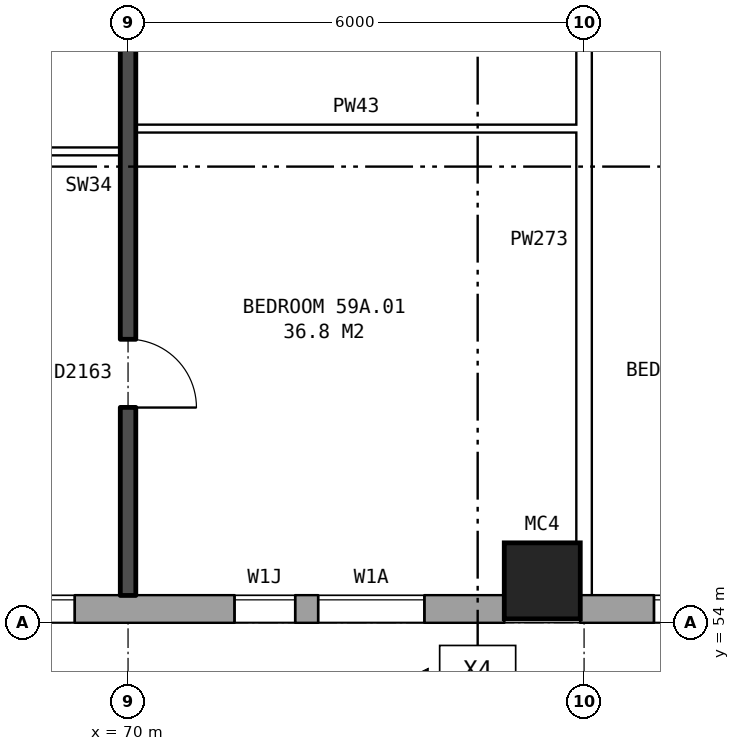
"""IFC4 building model, lengths in metres.
Left out: names, types, materials, properties, quantities, classifications, styles, units other than length and angle.
Written with IfcOpenShell. Run it as: python <this file> out.ifc"""

import sys

from ifc_helpers import new_model, si_unit, direction, frame, frame_2d, origin, origin_2d, place, context, subcontext, project, spatial, rectangle, hollow_rectangle, extrude, element, fill, save


model = new_model("IFC4")
c1 = context("Model", 3, precision=1e-05, world=origin(), true_north=direction((0.0, 1.0)))
c2 = subcontext(c1, "Body", "Model", "MODEL_VIEW")
j1 = project(units=[si_unit("LENGTHUNIT", "METRE"), si_unit("PLANEANGLEUNIT", "RADIAN")], contexts=[c1])
p1 = place(None, origin())
s1 = spatial("IfcSite", under=j1, at=p1, CompositionType="ELEMENT")
p2 = place(p1, origin())
s2 = spatial("IfcBuilding", under=s1, at=p2, CompositionType="ELEMENT")
p3 = place(p2, frame((0.0, 0.0, 209.0)))
s3 = spatial("IfcBuildingStorey", under=s2, at=p3, CompositionType="ELEMENT", Elevation=209.0)
p4 = place(p3, frame((75.45, 54.55, 0.0), z_axis=(0.0, 0.0, 1.0), x_axis=(1.0, 0.0, 0.0)))
e1 = element("IfcColumn", 1, at=p4, inside=s3, PredefinedType="COLUMN", context=c2, shape_type="SweptSolid", body=[
    extrude(hollow_rectangle(XDim=1.0, YDim=1.0, WallThickness=0.055, at=origin_2d()), origin(), (0.0, 0.0, 1.0), 3.1),
])
p5 = place(p3, frame((35.075, 54.18, 0.0), z_axis=(0.0, 0.0, 1.0), x_axis=(1.0, 0.0, 0.0)))
e2 = element("IfcWall", 2, at=p5, inside=s3, PredefinedType="STANDARD", context=c2, shape_type="SweptSolid", body=[
    extrude(rectangle(XDim=39.875, YDim=0.36, at=frame_2d((19.938, 0.0))), origin(), (0.0, 0.0, 1.0), 2.85),
])
p6 = place(p5, frame((0.3, 0.0, 0.8)))
e3 = element("IfcOpeningElement", 3, at=p6, cuts=e2, PredefinedType="OPENING", context=c2, shape_type="SweptSolid", body=[
    extrude(rectangle(XDim=1.0, YDim=1.8, at=frame_2d((0.5, 0.9))), frame((0.0, 0.19, 0.0), z_axis=(0.0, -1.0, 0.0), x_axis=(1.0, 0.0, 0.0)), (0.0, 0.0, 1.0), 0.38),
])
p7 = place(p5, frame((5.625, 0.0, 0.8)))
e4 = element("IfcOpeningElement", 4, at=p7, cuts=e2, PredefinedType="OPENING", context=c2, shape_type="SweptSolid", body=[
    extrude(rectangle(XDim=1.6, YDim=1.8, at=frame_2d((0.8, 0.9))), frame((0.0, 0.19, 0.0), z_axis=(0.0, -1.0, 0.0), x_axis=(1.0, 0.0, 0.0)), (0.0, 0.0, 1.0), 0.38),
])
p8 = place(p5, frame((8.625, 0.0, 0.8)))
e5 = element("IfcOpeningElement", 5, at=p8, cuts=e2, PredefinedType="OPENING", context=c2, shape_type="SweptSolid", body=[
    extrude(rectangle(XDim=1.6, YDim=1.8, at=frame_2d((0.8, 0.9))), frame((0.0, 0.19, 0.0), z_axis=(0.0, -1.0, 0.0), x_axis=(1.0, 0.0, 0.0)), (0.0, 0.0, 1.0), 0.38),
])
p9 = place(p5, frame((11.625, 0.0, 0.8)))
e6 = element("IfcOpeningElement", 6, at=p9, cuts=e2, PredefinedType="OPENING", context=c2, shape_type="SweptSolid", body=[
    extrude(rectangle(XDim=1.6, YDim=1.8, at=frame_2d((0.8, 0.9))), frame((0.0, 0.19, 0.0), z_axis=(0.0, -1.0, 0.0), x_axis=(1.0, 0.0, 0.0)), (0.0, 0.0, 1.0), 0.38),
])
p10 = place(p5, frame((14.625, 0.0, 0.8)))
e7 = element("IfcOpeningElement", 7, at=p10, cuts=e2, PredefinedType="OPENING", context=c2, shape_type="SweptSolid", body=[
    extrude(rectangle(XDim=1.6, YDim=1.8, at=frame_2d((0.8, 0.9))), frame((0.0, 0.19, 0.0), z_axis=(0.0, -1.0, 0.0), x_axis=(1.0, 0.0, 0.0)), (0.0, 0.0, 1.0), 0.38),
])
p11 = place(p5, frame((17.625, 0.0, 0.8)))
e8 = element("IfcOpeningElement", 8, at=p11, cuts=e2, PredefinedType="OPENING", context=c2, shape_type="SweptSolid", body=[
    extrude(rectangle(XDim=1.6, YDim=1.8, at=frame_2d((0.8, 0.9))), frame((0.0, 0.19, 0.0), z_axis=(0.0, -1.0, 0.0), x_axis=(1.0, 0.0, 0.0)), (0.0, 0.0, 1.0), 0.38),
])
p12 = place(p5, frame((20.625, 0.0, 0.8)))
e9 = element("IfcOpeningElement", 9, at=p12, cuts=e2, PredefinedType="OPENING", context=c2, shape_type="SweptSolid", body=[
    extrude(rectangle(XDim=1.6, YDim=1.8, at=frame_2d((0.8, 0.9))), frame((0.0, 0.19, 0.0), z_axis=(0.0, -1.0, 0.0), x_axis=(1.0, 0.0, 0.0)), (0.0, 0.0, 1.0), 0.38),
])
p13 = place(p5, frame((23.625, 0.0, 0.8)))
e10 = element("IfcOpeningElement", 10, at=p13, cuts=e2, PredefinedType="OPENING", context=c2, shape_type="SweptSolid", body=[
    extrude(rectangle(XDim=1.6, YDim=1.8, at=frame_2d((0.8, 0.9))), frame((0.0, 0.19, 0.0), z_axis=(0.0, -1.0, 0.0), x_axis=(1.0, 0.0, 0.0)), (0.0, 0.0, 1.0), 0.38),
])
p14 = place(p5, frame((26.625, 0.0, 0.8)))
e11 = element("IfcOpeningElement", 11, at=p14, cuts=e2, PredefinedType="OPENING", context=c2, shape_type="SweptSolid", body=[
    extrude(rectangle(XDim=1.6, YDim=1.8, at=frame_2d((0.8, 0.9))), frame((0.0, 0.19, 0.0), z_axis=(0.0, -1.0, 0.0), x_axis=(1.0, 0.0, 0.0)), (0.0, 0.0, 1.0), 0.38),
])
p15 = place(p5, frame((29.625, 0.0, 0.8)))
e12 = element("IfcOpeningElement", 12, at=p15, cuts=e2, PredefinedType="OPENING", context=c2, shape_type="SweptSolid", body=[
    extrude(rectangle(XDim=1.6, YDim=1.8, at=frame_2d((0.8, 0.9))), frame((0.0, 0.19, 0.0), z_axis=(0.0, -1.0, 0.0), x_axis=(1.0, 0.0, 0.0)), (0.0, 0.0, 1.0), 0.38),
])
p16 = place(p5, frame((32.625, 0.0, 0.8)))
e13 = element("IfcOpeningElement", 13, at=p16, cuts=e2, PredefinedType="OPENING", context=c2, shape_type="SweptSolid", body=[
    extrude(rectangle(XDim=1.6, YDim=1.8, at=frame_2d((0.8, 0.9))), frame((0.0, 0.19, 0.0), z_axis=(0.0, -1.0, 0.0), x_axis=(1.0, 0.0, 0.0)), (0.0, 0.0, 1.0), 0.38),
])
p17 = place(p5, frame((36.325, 0.0, 1.1)))
e14 = element("IfcOpeningElement", 14, at=p17, cuts=e2, PredefinedType="OPENING", context=c2, shape_type="SweptSolid", body=[
    extrude(rectangle(XDim=0.8, YDim=1.5, at=frame_2d((0.4, 0.75))), frame((0.0, 0.19, 0.0), z_axis=(0.0, -1.0, 0.0), x_axis=(1.0, 0.0, 0.0)), (0.0, 0.0, 1.0), 0.38),
])
p18 = place(p5, frame((3.65, 0.0, 0.8)))
e15 = element("IfcOpeningElement", 15, at=p18, cuts=e2, PredefinedType="OPENING", context=c2, shape_type="SweptSolid", body=[
    extrude(rectangle(XDim=1.0, YDim=1.8, at=frame_2d((0.5, 0.9))), frame((0.0, 0.19, 0.0), z_axis=(0.0, -1.0, 0.0), x_axis=(1.0, 0.0, 0.0)), (0.0, 0.0, 1.0), 0.38),
])
p19 = place(p5, frame((37.425, 0.0, 0.8)))
e16 = element("IfcOpeningElement", 16, at=p19, cuts=e2, PredefinedType="OPENING", context=c2, shape_type="SweptSolid", body=[
    extrude(rectangle(XDim=1.4, YDim=1.8, at=frame_2d((0.7, 0.9))), frame((0.0, 0.19, 0.0), z_axis=(0.0, -1.0, 0.0), x_axis=(1.0, 0.0, 0.0)), (0.0, 0.0, 1.0), 0.38),
])
p20 = place(p3, frame((75.95, 54.18, 0.0), z_axis=(0.0, 0.0, 1.0), x_axis=(1.0, 0.0, 0.0)))
e17 = element("IfcWall", 17, at=p20, inside=s3, PredefinedType="STANDARD", context=c2, shape_type="SweptSolid", body=[
    extrude(rectangle(XDim=55.1, YDim=0.36, at=frame_2d((27.55, 0.0))), origin(), (0.0, 0.0, 1.0), 2.85),
])
p21 = place(p20, frame((0.969, 0.0, 0.8)))
e18 = element("IfcOpeningElement", 18, at=p21, cuts=e17, PredefinedType="OPENING", context=c2, shape_type="SweptSolid", body=[
    extrude(rectangle(XDim=1.6, YDim=1.8, at=frame_2d((0.8, 0.9))), frame((0.0, 0.19, 0.0), z_axis=(0.0, -1.0, 0.0), x_axis=(1.0, 0.0, 0.0)), (0.0, 0.0, 1.0), 0.38),
])
p22 = place(p20, frame((4.406, 0.0, 0.8)))
e19 = element("IfcOpeningElement", 19, at=p22, cuts=e17, PredefinedType="OPENING", context=c2, shape_type="SweptSolid", body=[
    extrude(rectangle(XDim=1.6, YDim=1.8, at=frame_2d((0.8, 0.9))), frame((0.0, 0.19, 0.0), z_axis=(0.0, -1.0, 0.0), x_axis=(1.0, 0.0, 0.0)), (0.0, 0.0, 1.0), 0.38),
])
p23 = place(p20, frame((7.844, 0.0, 0.8)))
e20 = element("IfcOpeningElement", 20, at=p23, cuts=e17, PredefinedType="OPENING", context=c2, shape_type="SweptSolid", body=[
    extrude(rectangle(XDim=1.6, YDim=1.8, at=frame_2d((0.8, 0.9))), frame((0.0, 0.19, 0.0), z_axis=(0.0, -1.0, 0.0), x_axis=(1.0, 0.0, 0.0)), (0.0, 0.0, 1.0), 0.38),
])
p24 = place(p20, frame((11.281, 0.0, 0.8)))
e21 = element("IfcOpeningElement", 21, at=p24, cuts=e17, PredefinedType="OPENING", context=c2, shape_type="SweptSolid", body=[
    extrude(rectangle(XDim=1.6, YDim=1.8, at=frame_2d((0.8, 0.9))), frame((0.0, 0.19, 0.0), z_axis=(0.0, -1.0, 0.0), x_axis=(1.0, 0.0, 0.0)), (0.0, 0.0, 1.0), 0.38),
])
p25 = place(p20, frame((14.719, 0.0, 0.8)))
e22 = element("IfcOpeningElement", 22, at=p25, cuts=e17, PredefinedType="OPENING", context=c2, shape_type="SweptSolid", body=[
    extrude(rectangle(XDim=1.6, YDim=1.8, at=frame_2d((0.8, 0.9))), frame((0.0, 0.19, 0.0), z_axis=(0.0, -1.0, 0.0), x_axis=(1.0, 0.0, 0.0)), (0.0, 0.0, 1.0), 0.38),
])
p26 = place(p20, frame((18.156, 0.0, 0.8)))
e23 = element("IfcOpeningElement", 23, at=p26, cuts=e17, PredefinedType="OPENING", context=c2, shape_type="SweptSolid", body=[
    extrude(rectangle(XDim=1.6, YDim=1.8, at=frame_2d((0.8, 0.9))), frame((0.0, 0.19, 0.0), z_axis=(0.0, -1.0, 0.0), x_axis=(1.0, 0.0, 0.0)), (0.0, 0.0, 1.0), 0.38),
])
p27 = place(p20, frame((21.594, 0.0, 0.8)))
e24 = element("IfcOpeningElement", 24, at=p27, cuts=e17, PredefinedType="OPENING", context=c2, shape_type="SweptSolid", body=[
    extrude(rectangle(XDim=1.6, YDim=1.8, at=frame_2d((0.8, 0.9))), frame((0.0, 0.19, 0.0), z_axis=(0.0, -1.0, 0.0), x_axis=(1.0, 0.0, 0.0)), (0.0, 0.0, 1.0), 0.38),
])
p28 = place(p20, frame((25.031, 0.0, 0.8)))
e25 = element("IfcOpeningElement", 25, at=p28, cuts=e17, PredefinedType="OPENING", context=c2, shape_type="SweptSolid", body=[
    extrude(rectangle(XDim=1.6, YDim=1.8, at=frame_2d((0.8, 0.9))), frame((0.0, 0.19, 0.0), z_axis=(0.0, -1.0, 0.0), x_axis=(1.0, 0.0, 0.0)), (0.0, 0.0, 1.0), 0.38),
])
p29 = place(p20, frame((28.469, 0.0, 0.8)))
e26 = element("IfcOpeningElement", 26, at=p29, cuts=e17, PredefinedType="OPENING", context=c2, shape_type="SweptSolid", body=[
    extrude(rectangle(XDim=1.6, YDim=1.8, at=frame_2d((0.8, 0.9))), frame((0.0, 0.19, 0.0), z_axis=(0.0, -1.0, 0.0), x_axis=(1.0, 0.0, 0.0)), (0.0, 0.0, 1.0), 0.38),
])
p30 = place(p20, frame((31.906, 0.0, 0.8)))
e27 = element("IfcOpeningElement", 27, at=p30, cuts=e17, PredefinedType="OPENING", context=c2, shape_type="SweptSolid", body=[
    extrude(rectangle(XDim=1.6, YDim=1.8, at=frame_2d((0.8, 0.9))), frame((0.0, 0.19, 0.0), z_axis=(0.0, -1.0, 0.0), x_axis=(1.0, 0.0, 0.0)), (0.0, 0.0, 1.0), 0.38),
])
p31 = place(p20, frame((35.344, 0.0, 0.8)))
e28 = element("IfcOpeningElement", 28, at=p31, cuts=e17, PredefinedType="OPENING", context=c2, shape_type="SweptSolid", body=[
    extrude(rectangle(XDim=1.6, YDim=1.8, at=frame_2d((0.8, 0.9))), frame((0.0, 0.19, 0.0), z_axis=(0.0, -1.0, 0.0), x_axis=(1.0, 0.0, 0.0)), (0.0, 0.0, 1.0), 0.38),
])
p32 = place(p20, frame((38.781, 0.0, 0.8)))
e29 = element("IfcOpeningElement", 29, at=p32, cuts=e17, PredefinedType="OPENING", context=c2, shape_type="SweptSolid", body=[
    extrude(rectangle(XDim=1.6, YDim=1.8, at=frame_2d((0.8, 0.9))), frame((0.0, 0.19, 0.0), z_axis=(0.0, -1.0, 0.0), x_axis=(1.0, 0.0, 0.0)), (0.0, 0.0, 1.0), 0.38),
])
p33 = place(p20, frame((42.219, 0.0, 0.8)))
e30 = element("IfcOpeningElement", 30, at=p33, cuts=e17, PredefinedType="OPENING", context=c2, shape_type="SweptSolid", body=[
    extrude(rectangle(XDim=1.6, YDim=1.8, at=frame_2d((0.8, 0.9))), frame((0.0, 0.19, 0.0), z_axis=(0.0, -1.0, 0.0), x_axis=(1.0, 0.0, 0.0)), (0.0, 0.0, 1.0), 0.38),
])
p34 = place(p20, frame((45.656, 0.0, 0.8)))
e31 = element("IfcOpeningElement", 31, at=p34, cuts=e17, PredefinedType="OPENING", context=c2, shape_type="SweptSolid", body=[
    extrude(rectangle(XDim=1.6, YDim=1.8, at=frame_2d((0.8, 0.9))), frame((0.0, 0.19, 0.0), z_axis=(0.0, -1.0, 0.0), x_axis=(1.0, 0.0, 0.0)), (0.0, 0.0, 1.0), 0.38),
])
p35 = place(p20, frame((49.094, 0.0, 0.8)))
e32 = element("IfcOpeningElement", 32, at=p35, cuts=e17, PredefinedType="OPENING", context=c2, shape_type="SweptSolid", body=[
    extrude(rectangle(XDim=1.6, YDim=1.8, at=frame_2d((0.8, 0.9))), frame((0.0, 0.19, 0.0), z_axis=(0.0, -1.0, 0.0), x_axis=(1.0, 0.0, 0.0)), (0.0, 0.0, 1.0), 0.38),
])
p36 = place(p20, frame((52.531, 0.0, 0.8)))
e33 = element("IfcOpeningElement", 33, at=p36, cuts=e17, PredefinedType="OPENING", context=c2, shape_type="SweptSolid", body=[
    extrude(rectangle(XDim=1.6, YDim=1.8, at=frame_2d((0.8, 0.9))), frame((0.0, 0.19, 0.0), z_axis=(0.0, -1.0, 0.0), x_axis=(1.0, 0.0, 0.0)), (0.0, 0.0, 1.0), 0.38),
])
p37 = place(p3, frame((64.1, 60.2, 0.0), z_axis=(0.0, 0.0, 1.0), x_axis=(1.0, 0.0, 0.0)))
e34 = element("IfcWall", 34, at=p37, inside=s3, PredefinedType="PARTITIONING", context=c2, shape_type="SweptSolid", body=[
    extrude(rectangle(XDim=5.8, YDim=0.1, at=frame_2d((2.9, 0.0))), origin(), (0.0, 0.0, 1.0), 2.85),
])
p38 = place(p37, frame((3.6, 0.0, 0.0)))
e35 = element("IfcOpeningElement", 35, at=p38, cuts=e34, PredefinedType="OPENING", context=c2, shape_type="SweptSolid", body=[
    extrude(rectangle(XDim=0.9, YDim=2.1, at=frame_2d((0.45, 1.05))), frame((0.0, 0.06, 0.0), z_axis=(0.0, -1.0, 0.0), x_axis=(1.0, 0.0, 0.0)), (0.0, 0.0, 1.0), 0.12),
])
p39 = place(p37, frame((0.7, 0.0, 0.0)))
e36 = element("IfcOpeningElement", 36, at=p39, cuts=e34, PredefinedType="OPENING", context=c2, shape_type="SweptSolid", body=[
    extrude(rectangle(XDim=0.9, YDim=2.1, at=frame_2d((0.45, 1.05))), frame((0.0, 0.06, 0.0), z_axis=(0.0, -1.0, 0.0), x_axis=(1.0, 0.0, 0.0)), (0.0, 0.0, 1.0), 0.12),
])
p40 = place(p3, frame((70.1, 60.5, 0.0), z_axis=(0.0, 0.0, 1.0), x_axis=(1.0, 0.0, 0.0)))
e37 = element("IfcWall", 37, at=p40, inside=s3, PredefinedType="PARTITIONING", context=c2, shape_type="SweptSolid", body=[
    extrude(rectangle(XDim=5.8, YDim=0.1, at=frame_2d((2.9, 0.0))), origin(), (0.0, 0.0, 1.0), 2.85),
])
p41 = place(p3, frame((70.0, 54.36, 0.0), z_axis=(0.0, 0.0, 1.0), x_axis=(0.0, 1.0, 0.0)))
e38 = element("IfcWall", 38, at=p41, inside=s3, PredefinedType="SOLIDWALL", context=c2, shape_type="SweptSolid", body=[
    extrude(rectangle(XDim=9.44, YDim=0.2, at=frame_2d((4.72, 0.0))), origin(), (0.0, 0.0, 1.0), 2.85),
])
p42 = place(p41, frame((2.47, 0.0, 0.0)))
e39 = element("IfcOpeningElement", 39, at=p42, cuts=e38, PredefinedType="OPENING", context=c2, shape_type="SweptSolid", body=[
    extrude(rectangle(XDim=0.9, YDim=2.1, at=frame_2d((0.45, 1.05))), frame((0.0, 0.11, 0.0), z_axis=(0.0, -1.0, 0.0), x_axis=(1.0, 0.0, 0.0)), (0.0, 0.0, 1.0), 0.22),
])
p43 = place(p41, frame((7.39, 0.0, 0.0)))
e40 = element("IfcOpeningElement", 40, at=p43, cuts=e38, PredefinedType="OPENING", context=c2, shape_type="SweptSolid", body=[
    extrude(rectangle(XDim=0.8, YDim=2.1, at=frame_2d((0.4, 1.05))), frame((0.0, 0.11, 0.0), z_axis=(0.0, -1.0, 0.0), x_axis=(1.0, 0.0, 0.0)), (0.0, 0.0, 1.0), 0.22),
])
p44 = place(p3, frame((76.0, 54.36, 0.0), z_axis=(0.0, 0.0, 1.0), x_axis=(0.0, 1.0, 0.0)))
e41 = element("IfcWall", 41, at=p44, inside=s3, PredefinedType="PARTITIONING", context=c2, shape_type="SweptSolid", body=[
    extrude(rectangle(XDim=9.34, YDim=0.2, at=frame_2d((4.67, 0.0))), origin(), (0.0, 0.0, 1.0), 2.85),
])
p45 = place(p16, origin())
e42 = element("IfcWindow", 42, at=p45, inside=s3, PartitioningType="SINGLE_PANEL", PredefinedType="WINDOW", context=c2, shape_type="SweptSolid", body=[
    extrude(rectangle(XDim=1.6, YDim=1.8, at=frame_2d((0.8, 0.9))), frame((0.0, 0.15, 0.0), z_axis=(0.0, -1.0, 0.0), x_axis=(1.0, 0.0, 0.0)), (0.0, 0.0, 1.0), 0.06),
])
fill(e13, e42)
p46 = place(p17, origin())
e43 = element("IfcWindow", 43, at=p46, inside=s3, PartitioningType="SINGLE_PANEL", PredefinedType="WINDOW", context=c2, shape_type="SweptSolid", body=[
    extrude(rectangle(XDim=0.8, YDim=1.5, at=frame_2d((0.4, 0.75))), frame((0.0, 0.15, 0.0), z_axis=(0.0, -1.0, 0.0), x_axis=(1.0, 0.0, 0.0)), (0.0, 0.0, 1.0), 0.06),
])
fill(e14, e43)
p47 = place(p21, origin())
e44 = element("IfcWindow", 44, at=p47, inside=s3, PartitioningType="SINGLE_PANEL", PredefinedType="WINDOW", context=c2, shape_type="SweptSolid", body=[
    extrude(rectangle(XDim=1.6, YDim=1.8, at=frame_2d((0.8, 0.9))), frame((0.0, 0.15, 0.0), z_axis=(0.0, -1.0, 0.0), x_axis=(1.0, 0.0, 0.0)), (0.0, 0.0, 1.0), 0.06),
])
fill(e18, e44)
p48 = place(p42, frame((0.9, 0.0, 0.0), z_axis=(0.0, 0.0, 1.0), x_axis=(-1.0, 0.0, 0.0)))
e45 = element("IfcDoor", 45, at=p48, inside=s3, OperationType="SINGLE_SWING_RIGHT", PredefinedType="DOOR", context=c2, shape_type="SweptSolid", body=[
    extrude(rectangle(XDim=0.9, YDim=2.1, at=frame_2d((0.45, 1.05))), frame((0.0, 0.025, 0.0), z_axis=(0.0, -1.0, 0.0), x_axis=(1.0, 0.0, 0.0)), (0.0, 0.0, 1.0), 0.05),
])
fill(e39, e45)
p49 = place(p19, origin())
e46 = element("IfcWindow", 46, at=p49, inside=s3, PartitioningType="SINGLE_PANEL", PredefinedType="WINDOW", context=c2, shape_type="SweptSolid", body=[
    extrude(rectangle(XDim=1.4, YDim=1.8, at=frame_2d((0.7, 0.9))), frame((0.0, 0.15, 0.0), z_axis=(0.0, -1.0, 0.0), x_axis=(1.0, 0.0, 0.0)), (0.0, 0.0, 1.0), 0.06),
])
fill(e16, e46)
save(model, sys.argv[1])
